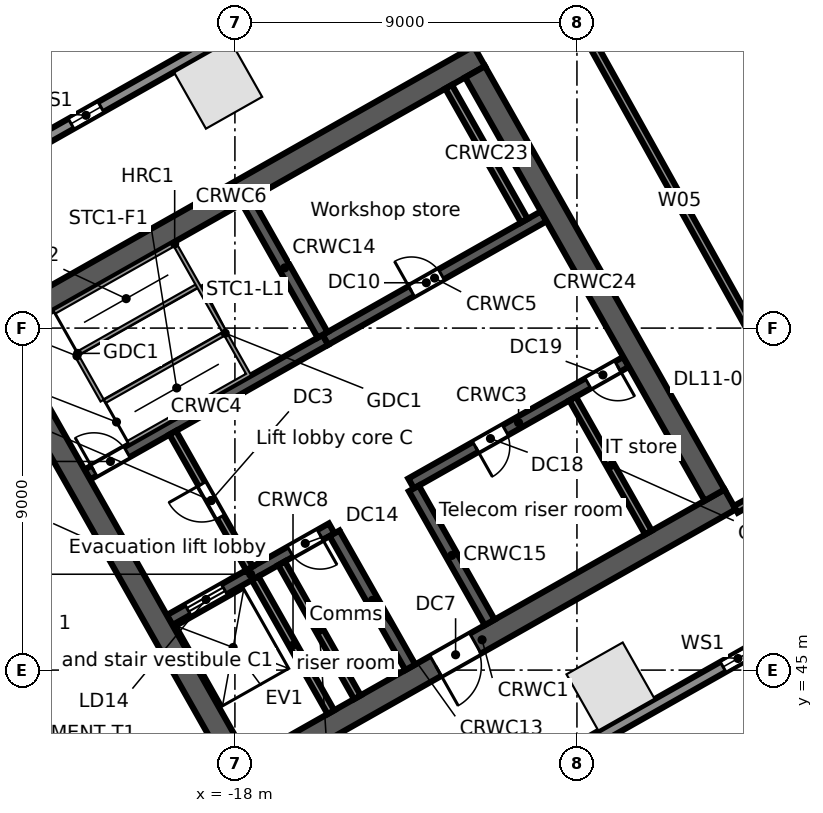
"""IFC4 building model, lengths in metres.
Left out: names, types, materials, properties, quantities, classifications, styles, units other than length and angle.
Written with IfcOpenShell. Run it as: python <this file> out.ifc"""

import sys

from ifc_helpers import new_model, si_unit, direction, frame, frame_2d, origin, origin_2d, place, context, subcontext, project, spatial, rectangle, extrude, element, fill, save


model = new_model("IFC4")
c1 = context("Model", 3, precision=1e-05, world=origin(), true_north=direction((0.0, 1.0)))
c2 = subcontext(c1, "Body", "Model", "MODEL_VIEW")
j1 = project(units=[si_unit("LENGTHUNIT", "METRE"), si_unit("PLANEANGLEUNIT", "RADIAN")], contexts=[c1])
p1 = place(None, origin())
s1 = spatial("IfcSite", under=j1, at=p1, CompositionType="ELEMENT")
p2 = place(p1, origin())
s2 = spatial("IfcBuilding", under=s1, at=p2, CompositionType="ELEMENT")
p3 = place(p2, frame((0.0, 0.0, 66.5)))
s3 = spatial("IfcBuildingStorey", under=s2, at=p3, CompositionType="ELEMENT", Elevation=66.5)
for number, where, z_axis, x_axis in (
    (1, (-18.441, 60.406, 0.0), (0.0, 0.0, 1.0), (-0.87, -0.492, 0.0)),
    (2, (-8.117, 44.568, 0.0), (0.0, 0.0, 1.0), (0.87, 0.492, 0.0)),
):
    element("IfcColumn", number, at=place(p3, frame(where, z_axis=z_axis, x_axis=x_axis)), inside=s3, PredefinedType="COLUMN", context=c2, shape_type="SweptSolid", body=[
        extrude(rectangle(XDim=1.7, YDim=1.7, at=origin_2d()), origin(), (0.0, 0.0, 1.0), 5.0),
    ])
p4 = place(p3, frame((-58.745, 38.764, 0.0), z_axis=(0.0, 0.0, 1.0), x_axis=(0.870355811726, 0.492423355453, 0.0)))
e3 = element("IfcWall", 3, at=p4, inside=s3, PredefinedType="STANDARD", context=c2, shape_type="SweptSolid", body=[
    extrude(rectangle(XDim=64.025, YDim=0.3, at=frame_2d((32.013, 0.0))), origin(), (0.0, 0.0, 1.0), 4.68),
])
p5 = place(p4, frame((60.122, 0.0, 0.6)))
e4 = element("IfcOpeningElement", 4, at=p5, cuts=e3, PredefinedType="OPENING", context=c2, shape_type="SweptSolid", body=[
    extrude(rectangle(XDim=0.9, YDim=3.2, at=frame_2d((0.45, 1.6))), frame((0.0, 0.16, 0.0), z_axis=(0.0, -1.0, 0.0), x_axis=(1.0, 0.0, 0.0)), (0.0, 0.0, 1.0), 0.32),
])
p6 = place(p4, frame((50.992, 0.0, 0.6)))
e5 = element("IfcOpeningElement", 5, at=p6, cuts=e3, PredefinedType="OPENING", context=c2, shape_type="SweptSolid", body=[
    extrude(rectangle(XDim=0.9, YDim=3.2, at=frame_2d((0.45, 1.6))), frame((0.0, 0.16, 0.0), z_axis=(0.0, -1.0, 0.0), x_axis=(1.0, 0.0, 0.0)), (0.0, 0.0, 1.0), 0.32),
])
p7 = place(p4, frame((41.862, 0.0, 0.6)))
e6 = element("IfcOpeningElement", 6, at=p7, cuts=e3, PredefinedType="OPENING", context=c2, shape_type="SweptSolid", body=[
    extrude(rectangle(XDim=0.9, YDim=3.2, at=frame_2d((0.45, 1.6))), frame((0.0, 0.16, 0.0), z_axis=(0.0, -1.0, 0.0), x_axis=(1.0, 0.0, 0.0)), (0.0, 0.0, 1.0), 0.32),
])
p8 = place(p4, frame((32.732, 0.0, 0.6)))
e7 = element("IfcOpeningElement", 7, at=p8, cuts=e3, PredefinedType="OPENING", context=c2, shape_type="SweptSolid", body=[
    extrude(rectangle(XDim=0.9, YDim=3.2, at=frame_2d((0.45, 1.6))), frame((0.0, 0.16, 0.0), z_axis=(0.0, -1.0, 0.0), x_axis=(1.0, 0.0, 0.0)), (0.0, 0.0, 1.0), 0.32),
])
p9 = place(p4, frame((23.602, 0.0, 0.6)))
e8 = element("IfcOpeningElement", 8, at=p9, cuts=e3, PredefinedType="OPENING", context=c2, shape_type="SweptSolid", body=[
    extrude(rectangle(XDim=0.9, YDim=3.2, at=frame_2d((0.45, 1.6))), frame((0.0, 0.16, 0.0), z_axis=(0.0, -1.0, 0.0), x_axis=(1.0, 0.0, 0.0)), (0.0, 0.0, 1.0), 0.32),
])
p10 = place(p4, frame((14.472, 0.0, 0.6)))
e9 = element("IfcOpeningElement", 9, at=p10, cuts=e3, PredefinedType="OPENING", context=c2, shape_type="SweptSolid", body=[
    extrude(rectangle(XDim=0.9, YDim=3.2, at=frame_2d((0.45, 1.6))), frame((0.0, 0.16, 0.0), z_axis=(0.0, -1.0, 0.0), x_axis=(1.0, 0.0, 0.0)), (0.0, 0.0, 1.0), 0.32),
])
p11 = place(p4, frame((5.342, 0.0, 0.6)))
e10 = element("IfcOpeningElement", 10, at=p11, cuts=e3, PredefinedType="OPENING", context=c2, shape_type="SweptSolid", body=[
    extrude(rectangle(XDim=0.9, YDim=3.2, at=frame_2d((0.45, 1.6))), frame((0.0, 0.16, 0.0), z_axis=(0.0, -1.0, 0.0), x_axis=(1.0, 0.0, 0.0)), (0.0, 0.0, 1.0), 0.32),
])
p12 = place(p3, frame((-0.055, 47.969, 0.0), z_axis=(0.0, 0.0, 1.0), x_axis=(-0.870355730478, -0.492423499058, 0.0)))
e11 = element("IfcWall", 11, at=p12, inside=s3, PredefinedType="STANDARD", context=c2, shape_type="SweptSolid", body=[
    extrude(rectangle(XDim=43.75, YDim=0.3, at=frame_2d((21.875, 0.0))), origin(), (0.0, 0.0, 1.0), 4.68),
])
p13 = place(p12, frame((39.977, 0.0, 0.6)))
e12 = element("IfcOpeningElement", 12, at=p13, cuts=e11, PredefinedType="OPENING", context=c2, shape_type="SweptSolid", body=[
    extrude(rectangle(XDim=0.9, YDim=3.2, at=frame_2d((0.45, 1.6))), frame((0.0, 0.16, 0.0), z_axis=(0.0, -1.0, 0.0), x_axis=(1.0, 0.0, 0.0)), (0.0, 0.0, 1.0), 0.32),
])
p14 = place(p12, frame((31.222, 0.0, 0.6)))
e13 = element("IfcOpeningElement", 13, at=p14, cuts=e11, PredefinedType="OPENING", context=c2, shape_type="SweptSolid", body=[
    extrude(rectangle(XDim=0.9, YDim=3.2, at=frame_2d((0.45, 1.6))), frame((0.0, 0.16, 0.0), z_axis=(0.0, -1.0, 0.0), x_axis=(1.0, 0.0, 0.0)), (0.0, 0.0, 1.0), 0.32),
])
p15 = place(p12, frame((22.468, 0.0, 0.6)))
e14 = element("IfcOpeningElement", 14, at=p15, cuts=e11, PredefinedType="OPENING", context=c2, shape_type="SweptSolid", body=[
    extrude(rectangle(XDim=0.9, YDim=3.2, at=frame_2d((0.45, 1.6))), frame((0.0, 0.16, 0.0), z_axis=(0.0, -1.0, 0.0), x_axis=(1.0, 0.0, 0.0)), (0.0, 0.0, 1.0), 0.32),
])
p16 = place(p12, frame((13.713, 0.0, 0.6)))
e15 = element("IfcOpeningElement", 15, at=p16, cuts=e11, PredefinedType="OPENING", context=c2, shape_type="SweptSolid", body=[
    extrude(rectangle(XDim=0.9, YDim=3.2, at=frame_2d((0.45, 1.6))), frame((0.0, 0.16, 0.0), z_axis=(0.0, -1.0, 0.0), x_axis=(1.0, 0.0, 0.0)), (0.0, 0.0, 1.0), 0.32),
])
p17 = place(p12, frame((4.959, 0.0, 0.6)))
e16 = element("IfcOpeningElement", 16, at=p17, cuts=e11, PredefinedType="OPENING", context=c2, shape_type="SweptSolid", body=[
    extrude(rectangle(XDim=0.9, YDim=3.2, at=frame_2d((0.45, 1.6))), frame((0.0, 0.16, 0.0), z_axis=(0.0, -1.0, 0.0), x_axis=(1.0, 0.0, 0.0)), (0.0, 0.0, 1.0), 0.32),
])
p18 = place(p3, frame((-18.024, 42.104, 0.0), z_axis=(0.0, 0.0, 1.0), x_axis=(0.870360574057, 0.492414937962, 0.0)))
e17 = element("IfcWall", 17, at=p18, inside=s3, PredefinedType="SOLIDWALL", context=c2, shape_type="SweptSolid", body=[
    extrude(rectangle(XDim=15.0, YDim=0.6, at=frame_2d((7.5, 0.0))), origin(), (0.0, 0.0, 1.0), 4.68),
])
p19 = place(p18, frame((6.1, 0.0, 0.0)))
e18 = element("IfcOpeningElement", 18, at=p19, cuts=e17, PredefinedType="OPENING", context=c2, shape_type="SweptSolid", body=[
    extrude(rectangle(XDim=1.2, YDim=2.1, at=frame_2d((0.6, 1.05))), frame((0.0, 0.31, 0.0), z_axis=(0.0, -1.0, 0.0), x_axis=(1.0, 0.0, 0.0)), (0.0, 0.0, 1.0), 0.62),
])
p20 = place(p3, frame((-19.718, 46.316, 0.0), z_axis=(0.0, 0.0, 1.0), x_axis=(0.870353963862, 0.492426621528, 0.0)))
e19 = element("IfcWall", 19, at=p20, inside=s3, PredefinedType="SOLIDWALL", context=c2, shape_type="SweptSolid", body=[
    extrude(rectangle(XDim=4.9, YDim=0.3, at=frame_2d((2.45, 0.0))), origin(), (0.0, 0.0, 1.0), 4.68),
])
p21 = place(p20, frame((0.55, 0.0, 0.0)))
e20 = element("IfcOpeningElement", 20, at=p21, cuts=e19, PredefinedType="OPENING", context=c2, shape_type="SweptSolid", body=[
    extrude(rectangle(XDim=1.1, YDim=2.1, at=frame_2d((0.55, 1.05))), frame((0.0, 0.16, 0.0), z_axis=(0.0, -1.0, 0.0), x_axis=(1.0, 0.0, 0.0)), (0.0, 0.0, 1.0), 0.32),
])
p22 = place(p20, frame((3.65, 0.0, 0.0)))
e21 = element("IfcOpeningElement", 21, at=p22, cuts=e19, PredefinedType="OPENING", context=c2, shape_type="SweptSolid", body=[
    extrude(rectangle(XDim=0.9, YDim=2.1, at=frame_2d((0.45, 1.05))), frame((0.0, 0.16, 0.0), z_axis=(0.0, -1.0, 0.0), x_axis=(1.0, 0.0, 0.0)), (0.0, 0.0, 1.0), 0.32),
])
p23 = place(p3, frame((-13.365, 49.911, 0.0), z_axis=(0.0, 0.0, 1.0), x_axis=(0.870340995471, 0.49244954219, 0.0)))
e22 = element("IfcWall", 22, at=p23, inside=s3, PredefinedType="SOLIDWALL", context=c2, shape_type="SweptSolid", body=[
    extrude(rectangle(XDim=6.5, YDim=0.3, at=frame_2d((3.25, 0.0))), origin(), (0.0, 0.0, 1.0), 4.68),
])
p24 = place(p23, frame((1.95, 0.0, 0.0)))
e23 = element("IfcOpeningElement", 23, at=p24, cuts=e22, PredefinedType="OPENING", context=c2, shape_type="SweptSolid", body=[
    extrude(rectangle(XDim=0.9, YDim=2.1, at=frame_2d((0.45, 1.05))), frame((0.0, 0.16, 0.0), z_axis=(0.0, -1.0, 0.0), x_axis=(1.0, 0.0, 0.0)), (0.0, 0.0, 1.0), 0.32),
])
p25 = place(p23, frame((5.35, 0.0, 0.0)))
e24 = element("IfcOpeningElement", 24, at=p25, cuts=e22, PredefinedType="OPENING", context=c2, shape_type="SweptSolid", body=[
    extrude(rectangle(XDim=0.9, YDim=2.1, at=frame_2d((0.45, 1.05))), frame((0.0, 0.16, 0.0), z_axis=(0.0, -1.0, 0.0), x_axis=(1.0, 0.0, 0.0)), (0.0, 0.0, 1.0), 0.32),
])
p26 = place(p3, frame((-21.885, 50.146, 0.0), z_axis=(0.0, 0.0, 1.0), x_axis=(0.870359411463, 0.492416992881, 0.0)))
e25 = element("IfcWall", 25, at=p26, inside=s3, PredefinedType="SOLIDWALL", context=c2, shape_type="SweptSolid", body=[
    extrude(rectangle(XDim=7.2, YDim=0.3, at=frame_2d((3.6, 0.0))), origin(), (0.0, 0.0, 1.0), 4.68),
])
p27 = place(p26, frame((0.2, 0.0, 0.0)))
e26 = element("IfcOpeningElement", 26, at=p27, cuts=e25, PredefinedType="OPENING", context=c2, shape_type="SweptSolid", body=[
    extrude(rectangle(XDim=1.0, YDim=2.1, at=frame_2d((0.5, 1.05))), frame((0.0, 0.16, 0.0), z_axis=(0.0, -1.0, 0.0), x_axis=(1.0, 0.0, 0.0)), (0.0, 0.0, 1.0), 0.32),
])
p28 = place(p3, frame((-15.618, 53.691, 0.0), z_axis=(0.0, 0.0, 1.0), x_axis=(0.870356769198, 0.492421663121, 0.0)))
e27 = element("IfcWall", 27, at=p28, inside=s3, PredefinedType="SOLIDWALL", context=c2, shape_type="SweptSolid", body=[
    extrude(rectangle(XDim=6.6, YDim=0.3, at=frame_2d((3.3, 0.0))), origin(), (0.0, 0.0, 1.0), 4.68),
])
p29 = place(p28, frame((2.6, 0.0, 0.0)))
e28 = element("IfcOpeningElement", 28, at=p29, cuts=e27, PredefinedType="OPENING", context=c2, shape_type="SweptSolid", body=[
    extrude(rectangle(XDim=0.9, YDim=2.1, at=frame_2d((0.45, 1.05))), frame((0.0, 0.16, 0.0), z_axis=(0.0, -1.0, 0.0), x_axis=(1.0, 0.0, 0.0)), (0.0, 0.0, 1.0), 0.32),
])
p30 = place(p3, frame((-24.623, 53.767, 0.0), z_axis=(0.0, 0.0, 1.0), x_axis=(0.870356627484, 0.492421913601, 0.0)))
e29 = element("IfcWall", 29, at=p30, inside=s3, PredefinedType="SOLIDWALL", context=c2, shape_type="SweptSolid", body=[
    extrude(rectangle(XDim=15.0, YDim=0.6, at=frame_2d((7.5, 0.0))), origin(), (0.0, 0.0, 1.0), 4.68),
])
p31 = place(p3, frame((-24.214, 53.654, 0.0), z_axis=(0.0, 0.0, 1.0), x_axis=(0.492441221355, -0.870345703448, 0.0)))
e30 = element("IfcWall", 30, at=p31, inside=s3, PredefinedType="SOLIDWALL", context=c2, shape_type="SweptSolid", body=[
    extrude(rectangle(XDim=12.8, YDim=0.6, at=frame_2d((6.4, 0.0))), origin(), (0.0, 0.0, 1.0), 4.68),
])
p32 = place(p3, frame((-17.469, 47.417, 0.0), z_axis=(0.0, 0.0, 1.0), x_axis=(0.492440575896, -0.870346068648, 0.0)))
e31 = element("IfcWall", 31, at=p32, inside=s3, PredefinedType="SOLIDWALL", context=c2, shape_type="SweptSolid", body=[
    extrude(rectangle(XDim=4.05, YDim=0.2, at=frame_2d((2.025, 0.0))), origin(), (0.0, 0.0, 1.0), 4.68),
])
p33 = place(p3, frame((-19.635, 51.246, 0.0), z_axis=(0.0, 0.0, 1.0), x_axis=(0.492408451753, -0.87036424366, 0.0)))
e32 = element("IfcWall", 32, at=p33, inside=s3, PredefinedType="PARTITIONING", context=c2, shape_type="SweptSolid", body=[
    extrude(rectangle(XDim=4.1, YDim=0.2, at=frame_2d((2.05, 0.0))), origin(), (0.0, 0.0, 1.0), 4.68),
])
p34 = place(p33, frame((1.55, 0.0, 0.0)))
e33 = element("IfcOpeningElement", 33, at=p34, cuts=e32, PredefinedType="OPENING", context=c2, shape_type="SweptSolid", body=[
    extrude(rectangle(XDim=1.0, YDim=2.1, at=frame_2d((0.5, 1.05))), frame((0.0, 0.11, 0.0), z_axis=(0.0, -1.0, 0.0), x_axis=(1.0, 0.0, 0.0)), (0.0, 0.0, 1.0), 0.22),
])
p35 = place(p3, frame((-16.772, 47.811, 0.0), z_axis=(0.0, 0.0, 1.0), x_axis=(0.492440575896, -0.870346068648, 0.0)))
e34 = element("IfcWall", 34, at=p35, inside=s3, PredefinedType="SOLIDWALL", context=c2, shape_type="SweptSolid", body=[
    extrude(rectangle(XDim=4.05, YDim=0.2, at=frame_2d((2.025, 0.0))), origin(), (0.0, 0.0, 1.0), 4.68),
])
p36 = place(p3, frame((-15.379, 48.599, 0.0), z_axis=(0.0, 0.0, 1.0), x_axis=(0.492394910396, -0.870371904542, 0.0)))
e35 = element("IfcWall", 35, at=p36, inside=s3, PredefinedType="SOLIDWALL", context=c2, shape_type="SweptSolid", body=[
    extrude(rectangle(XDim=4.05, YDim=0.3, at=frame_2d((2.025, 0.0))), origin(), (0.0, 0.0, 1.0), 4.68),
])
p37 = place(p3, frame((-17.686, 57.347, 0.0), z_axis=(0.0, 0.0, 1.0), x_axis=(0.492420746998, -0.870357287513, 0.0)))
e36 = element("IfcWall", 36, at=p37, inside=s3, PredefinedType="SOLIDWALL", context=c2, shape_type="SweptSolid", body=[
    extrude(rectangle(XDim=4.05, YDim=0.3, at=frame_2d((2.025, 0.0))), origin(), (0.0, 0.0, 1.0), 4.68),
])
p38 = place(p3, frame((-13.291, 49.781, 0.0), z_axis=(0.0, 0.0, 1.0), x_axis=(0.492394910396, -0.870371904542, 0.0)))
e37 = element("IfcWall", 37, at=p38, inside=s3, PredefinedType="SOLIDWALL", context=c2, shape_type="SweptSolid", body=[
    extrude(rectangle(XDim=4.05, YDim=0.3, at=frame_2d((2.025, 0.0))), origin(), (0.0, 0.0, 1.0), 4.68),
])
p39 = place(p3, frame((-9.113, 52.144, 0.0), z_axis=(0.0, 0.0, 1.0), x_axis=(0.492394910396, -0.870371904542, 0.0)))
e38 = element("IfcWall", 38, at=p39, inside=s3, PredefinedType="PARTITIONING", context=c2, shape_type="SweptSolid", body=[
    extrude(rectangle(XDim=4.05, YDim=0.2, at=frame_2d((2.025, 0.0))), origin(), (0.0, 0.0, 1.0), 4.68),
])
p40 = place(p3, frame((-12.377, 60.351, 0.0), z_axis=(0.0, 0.0, 1.0), x_axis=(0.492440575896, -0.870346068648, 0.0)))
e39 = element("IfcWall", 39, at=p40, inside=s3, PredefinedType="SOLIDWALL", context=c2, shape_type="SweptSolid", body=[
    extrude(rectangle(XDim=4.05, YDim=0.2, at=frame_2d((2.025, 0.0))), origin(), (0.0, 0.0, 1.0), 4.68),
])
p41 = place(p3, frame((-11.681, 60.744, 0.0), z_axis=(0.0, 0.0, 1.0), x_axis=(0.492426772896, -0.870353878221, 0.0)))
e40 = element("IfcWall", 40, at=p41, inside=s3, PredefinedType="SOLIDWALL", context=c2, shape_type="SweptSolid", body=[
    extrude(rectangle(XDim=12.8, YDim=0.6, at=frame_2d((6.4, 0.0))), origin(), (0.0, 0.0, 1.0), 4.68),
])
p42 = place(p3, frame((-10.088, 64.155, 0.0), z_axis=(0.0, 0.0, 1.0), x_axis=(0.486446127767, -0.873710572661, 0.0)))
e41 = element("IfcWall", 41, at=p42, inside=s3, PredefinedType="PARTITIONING", context=c2, shape_type="SweptSolid", body=[
    extrude(rectangle(XDim=15.584, YDim=0.2, at=frame_2d((7.792, 0.0))), origin(), (0.0, 0.0, 1.0), 3.76),
])
p43 = place(p3, frame((-4.821, 49.23, 0.0), z_axis=(0.0, 0.0, 1.0), x_axis=(0.870371217631, 0.492396124598, 0.0)))
e42 = element("IfcWall", 42, at=p43, inside=s3, PredefinedType="PARTITIONING", context=c2, shape_type="SweptSolid", body=[
    extrude(rectangle(XDim=2.659, YDim=0.2, at=frame_2d((1.329, 0.0))), origin(), (0.0, 0.0, 1.0), 4.68),
])
p44 = place(p7, origin())
e43 = element("IfcWindow", 43, at=p44, inside=s3, PartitioningType="SINGLE_PANEL", PredefinedType="WINDOW", context=c2, shape_type="SweptSolid", body=[
    extrude(rectangle(XDim=0.9, YDim=3.2, at=frame_2d((0.45, 1.6))), frame((0.0, 0.03, 0.0), z_axis=(0.0, -1.0, 0.0), x_axis=(1.0, 0.0, 0.0)), (0.0, 0.0, 1.0), 0.06),
])
fill(e6, e43)
p45 = place(p17, origin())
e44 = element("IfcWindow", 44, at=p45, inside=s3, PartitioningType="SINGLE_PANEL", PredefinedType="WINDOW", context=c2, shape_type="SweptSolid", body=[
    extrude(rectangle(XDim=0.9, YDim=3.2, at=frame_2d((0.45, 1.6))), frame((0.0, 0.03, 0.0), z_axis=(0.0, -1.0, 0.0), x_axis=(1.0, 0.0, 0.0)), (0.0, 0.0, 1.0), 0.06),
])
fill(e16, e44)
p46 = place(p21, origin())
e45 = element("IfcDoor", 45, at=p46, inside=s3, OperationType="DOUBLE_DOOR_SLIDING", PredefinedType="DOOR", context=c2, shape_type="SweptSolid", body=[
    extrude(rectangle(XDim=1.1, YDim=2.1, at=frame_2d((0.55, 1.05))), frame((0.0, 0.025, 0.0), z_axis=(0.0, -1.0, 0.0), x_axis=(1.0, 0.0, 0.0)), (0.0, 0.0, 1.0), 0.05),
])
fill(e20, e45)
p47 = place(p27, origin())
e46 = element("IfcDoor", 46, at=p47, inside=s3, OperationType="SINGLE_SWING_LEFT", PredefinedType="DOOR", context=c2, shape_type="SweptSolid", body=[
    extrude(rectangle(XDim=1.0, YDim=2.1, at=frame_2d((0.5, 1.05))), frame((0.0, 0.025, 0.0), z_axis=(0.0, -1.0, 0.0), x_axis=(1.0, 0.0, 0.0)), (0.0, 0.0, 1.0), 0.05),
])
fill(e26, e46)
p48 = place(p34, frame((1.0, 0.0, 0.0), z_axis=(0.0, 0.0, 1.0), x_axis=(-1.0, 0.0, 0.0)))
e47 = element("IfcDoor", 47, at=p48, inside=s3, OperationType="SINGLE_SWING_RIGHT", PredefinedType="DOOR", context=c2, shape_type="SweptSolid", body=[
    extrude(rectangle(XDim=1.0, YDim=2.1, at=frame_2d((0.5, 1.05))), frame((0.0, 0.025, 0.0), z_axis=(0.0, -1.0, 0.0), x_axis=(1.0, 0.0, 0.0)), (0.0, 0.0, 1.0), 0.05),
])
fill(e33, e47)
p49 = place(p19, frame((1.2, 0.0, 0.0), z_axis=(0.0, 0.0, 1.0), x_axis=(-1.0, 0.0, 0.0)))
e48 = element("IfcDoor", 48, at=p49, inside=s3, OperationType="SINGLE_SWING_RIGHT", PredefinedType="DOOR", context=c2, shape_type="SweptSolid", body=[
    extrude(rectangle(XDim=1.2, YDim=2.1, at=frame_2d((0.6, 1.05))), frame((0.0, 0.025, 0.0), z_axis=(0.0, -1.0, 0.0), x_axis=(1.0, 0.0, 0.0)), (0.0, 0.0, 1.0), 0.05),
])
fill(e18, e48)
p50 = place(p29, origin())
e49 = element("IfcDoor", 49, at=p50, inside=s3, OperationType="SINGLE_SWING_LEFT", PredefinedType="DOOR", context=c2, shape_type="SweptSolid", body=[
    extrude(rectangle(XDim=0.9, YDim=2.1, at=frame_2d((0.45, 1.05))), frame((0.0, 0.025, 0.0), z_axis=(0.0, -1.0, 0.0), x_axis=(1.0, 0.0, 0.0)), (0.0, 0.0, 1.0), 0.05),
])
fill(e28, e49)
p51 = place(p22, frame((0.9, 0.0, 0.0), z_axis=(0.0, 0.0, 1.0), x_axis=(-1.0, 0.0, 0.0)))
e50 = element("IfcDoor", 50, at=p51, inside=s3, OperationType="SINGLE_SWING_LEFT", PredefinedType="DOOR", context=c2, shape_type="SweptSolid", body=[
    extrude(rectangle(XDim=0.9, YDim=2.1, at=frame_2d((0.45, 1.05))), frame((0.0, 0.025, 0.0), z_axis=(0.0, -1.0, 0.0), x_axis=(1.0, 0.0, 0.0)), (0.0, 0.0, 1.0), 0.05),
])
fill(e21, e50)
p52 = place(p24, frame((0.9, 0.0, 0.0), z_axis=(0.0, 0.0, 1.0), x_axis=(-1.0, 0.0, 0.0)))
e51 = element("IfcDoor", 51, at=p52, inside=s3, OperationType="SINGLE_SWING_RIGHT", PredefinedType="DOOR", context=c2, shape_type="SweptSolid", body=[
    extrude(rectangle(XDim=0.9, YDim=2.1, at=frame_2d((0.45, 1.05))), frame((0.0, 0.025, 0.0), z_axis=(0.0, -1.0, 0.0), x_axis=(1.0, 0.0, 0.0)), (0.0, 0.0, 1.0), 0.05),
])
fill(e23, e51)
p53 = place(p25, frame((0.9, 0.0, 0.0), z_axis=(0.0, 0.0, 1.0), x_axis=(-1.0, 0.0, 0.0)))
e52 = element("IfcDoor", 52, at=p53, inside=s3, OperationType="SINGLE_SWING_LEFT", PredefinedType="DOOR", context=c2, shape_type="SweptSolid", body=[
    extrude(rectangle(XDim=0.9, YDim=2.1, at=frame_2d((0.45, 1.05))), frame((0.0, 0.025, 0.0), z_axis=(0.0, -1.0, 0.0), x_axis=(1.0, 0.0, 0.0)), (0.0, 0.0, 1.0), 0.05),
])
fill(e24, e52)
save(model, sys.argv[1])
